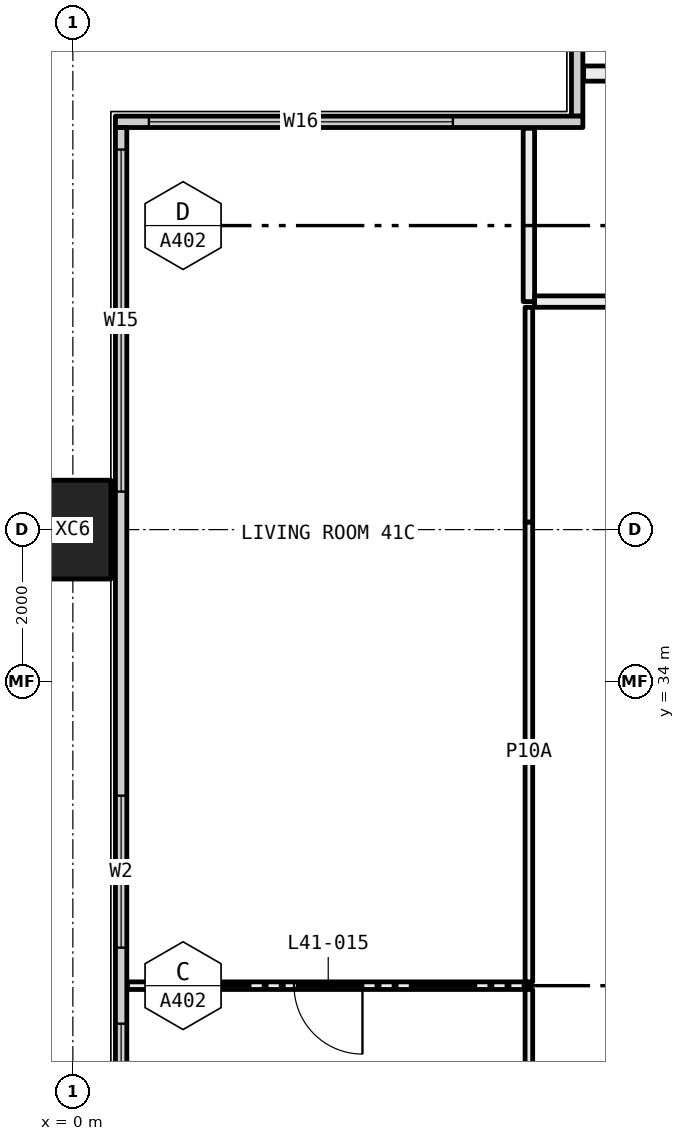
"""IFC4 building model, lengths in metres.
Left out: names, types, materials, properties, quantities, classifications, styles, units other than length and angle.
Written with IfcOpenShell. Run it as: python <this file> out.ifc"""

import sys

from ifc_helpers import new_model, si_unit, direction, frame, frame_2d, origin, origin_2d, place, context, subcontext, project, spatial, rectangle, hollow_rectangle, extrude, element, fill, save


model = new_model("IFC4")
c1 = context("Model", 3, precision=1e-05, world=origin(), true_north=direction((0.0, 1.0)))
c2 = subcontext(c1, "Body", "Model", "MODEL_VIEW")
j1 = project(units=[si_unit("LENGTHUNIT", "METRE"), si_unit("PLANEANGLEUNIT", "RADIAN")], contexts=[c1])
p1 = place(None, origin())
s1 = spatial("IfcSite", under=j1, at=p1, CompositionType="ELEMENT")
p2 = place(p1, origin())
s2 = spatial("IfcBuilding", under=s1, at=p2, CompositionType="ELEMENT")
p3 = place(p2, frame((0.0, 0.0, 158.25)))
s3 = spatial("IfcBuildingStorey", under=s2, at=p3, CompositionType="ELEMENT", Elevation=158.25)
p4 = place(p3, frame((0.0, 36.0, -0.4), z_axis=(0.0, 0.0, 1.0), x_axis=(0.0, 1.0, 0.0)))
e1 = element("IfcColumn", 1, at=p4, inside=s3, PredefinedType="COLUMN", context=c2, shape_type="SweptSolid", body=[
    extrude(hollow_rectangle(XDim=1.3, YDim=1.0, WallThickness=0.05, at=origin_2d()), origin(), (0.0, 0.0, 1.0), 3.45),
])
p5 = place(p3, frame((6.635, 41.44, 0.0), z_axis=(0.0, 0.0, 1.0), x_axis=(0.0, 1.0, 0.0)))
e2 = element("IfcWall", 2, at=p5, inside=s3, PredefinedType="ELEMENTEDWALL", context=c2, shape_type="SweptSolid", body=[
    extrude(rectangle(XDim=5.85, YDim=0.15, at=frame_2d((2.925, 0.0))), origin(), (0.0, 0.0, 1.0), 3.05),
])
p6 = place(p5, frame((1.56, 0.0, 0.45)))
e3 = element("IfcOpeningElement", 3, at=p6, cuts=e2, PredefinedType="OPENING", context=c2, shape_type="SweptSolid", body=[
    extrude(rectangle(XDim=4.0, YDim=2.55, at=frame_2d((2.0, 1.275))), frame((0.0, 0.085, 0.0), z_axis=(0.0, -1.0, 0.0), x_axis=(1.0, 0.0, 0.0)), (0.0, 0.0, 1.0), 0.17),
])
p7 = place(p3, frame((0.56, 41.365, 0.0), z_axis=(0.0, 0.0, 1.0), x_axis=(1.0, 0.0, 0.0)))
e4 = element("IfcWall", 4, at=p7, inside=s3, PredefinedType="ELEMENTEDWALL", context=c2, shape_type="SweptSolid", body=[
    extrude(rectangle(XDim=6.15, YDim=0.15, at=frame_2d((3.075, 0.0))), origin(), (0.0, 0.0, 1.0), 3.05),
])
p8 = place(p7, frame((0.44, 0.0, 0.45)))
e5 = element("IfcOpeningElement", 5, at=p8, cuts=e4, PredefinedType="OPENING", context=c2, shape_type="SweptSolid", body=[
    extrude(rectangle(XDim=4.0, YDim=2.55, at=frame_2d((2.0, 1.275))), frame((0.0, 0.085, 0.0), z_axis=(0.0, -1.0, 0.0), x_axis=(1.0, 0.0, 0.0)), (0.0, 0.0, 1.0), 0.17),
])
p9 = place(p3, frame((0.635, 18.71, 0.0), z_axis=(0.0, 0.0, 1.0), x_axis=(0.0, 1.0, 0.0)))
e6 = element("IfcWall", 6, at=p9, inside=s3, PredefinedType="ELEMENTEDWALL", context=c2, shape_type="SweptSolid", body=[
    extrude(rectangle(XDim=22.58, YDim=0.15, at=frame_2d((11.29, 0.0))), origin(), (0.0, 0.0, 1.0), 3.05),
])
p10 = place(p9, frame((0.29, 0.0, 0.45)))
e7 = element("IfcOpeningElement", 7, at=p10, cuts=e6, PredefinedType="OPENING", context=c2, shape_type="SweptSolid", body=[
    extrude(rectangle(XDim=4.5, YDim=2.55, at=frame_2d((2.25, 1.275))), frame((0.0, 0.085, 0.0), z_axis=(0.0, -1.0, 0.0), x_axis=(1.0, 0.0, 0.0)), (0.0, 0.0, 1.0), 0.17),
])
p11 = place(p9, frame((7.79, 0.0, 0.45)))
e8 = element("IfcOpeningElement", 8, at=p11, cuts=e6, PredefinedType="OPENING", context=c2, shape_type="SweptSolid", body=[
    extrude(rectangle(XDim=3.0, YDim=2.55, at=frame_2d((1.5, 1.275))), frame((0.0, 0.085, 0.0), z_axis=(0.0, -1.0, 0.0), x_axis=(1.0, 0.0, 0.0)), (0.0, 0.0, 1.0), 0.17),
])
p12 = place(p9, frame((11.79, 0.0, 0.45)))
e9 = element("IfcOpeningElement", 9, at=p12, cuts=e6, PredefinedType="OPENING", context=c2, shape_type="SweptSolid", body=[
    extrude(rectangle(XDim=2.0, YDim=2.55, at=frame_2d((1.0, 1.275))), frame((0.0, 0.085, 0.0), z_axis=(0.0, -1.0, 0.0), x_axis=(1.0, 0.0, 0.0)), (0.0, 0.0, 1.0), 0.17),
])
p13 = place(p9, frame((17.79, 0.0, 0.45)))
e10 = element("IfcOpeningElement", 10, at=p13, cuts=e6, PredefinedType="OPENING", context=c2, shape_type="SweptSolid", body=[
    extrude(rectangle(XDim=4.5, YDim=2.55, at=frame_2d((2.25, 1.275))), frame((0.0, 0.085, 0.0), z_axis=(0.0, -1.0, 0.0), x_axis=(1.0, 0.0, 0.0)), (0.0, 0.0, 1.0), 0.17),
])
p14 = place(p3, frame((6.72, 42.0, 0.0), z_axis=(0.0, 0.0, 1.0), x_axis=(1.0, 0.0, 0.0)))
e11 = element("IfcWall", 11, at=p14, inside=s3, PredefinedType="PARTITIONING", context=c2, shape_type="SweptSolid", body=[
    extrude(rectangle(XDim=3.38, YDim=0.2, at=frame_2d((1.69, 0.0))), origin(), (0.0, 0.0, 1.0), 3.05),
])
p15 = place(p3, frame((6.0, 30.0, 0.0), z_axis=(0.0, 0.0, 1.0), x_axis=(-1.0, 0.0, 0.0)))
e12 = element("IfcWall", 12, at=p15, inside=s3, PredefinedType="PARTITIONING", context=c2, shape_type="SweptSolid", body=[
    extrude(rectangle(XDim=5.28, YDim=0.1, at=frame_2d((2.64, 0.0))), origin(), (0.0, 0.0, 1.0), 3.05),
])
p16 = place(p15, frame((2.19, 0.0, 0.0)))
e13 = element("IfcOpeningElement", 13, at=p16, cuts=e12, PredefinedType="OPENING", context=c2, shape_type="SweptSolid", body=[
    extrude(rectangle(XDim=0.9, YDim=2.1, at=frame_2d((0.45, 1.05))), frame((0.0, 0.06, 0.0), z_axis=(0.0, -1.0, 0.0), x_axis=(1.0, 0.0, 0.0)), (0.0, 0.0, 1.0), 0.12),
])
p17 = place(p3, frame((6.0, 25.5, 0.0), z_axis=(0.0, 0.0, 1.0), x_axis=(0.0, 1.0, 0.0)))
e14 = element("IfcWall", 14, at=p17, inside=s3, PredefinedType="PARTITIONING", context=c2, shape_type="SweptSolid", body=[
    extrude(rectangle(XDim=4.45, YDim=0.1, at=frame_2d((2.225, 0.0))), origin(), (0.0, 0.0, 1.0), 3.05),
])
p18 = place(p3, frame((6.0, 30.05, 0.0), z_axis=(0.0, 0.0, 1.0), x_axis=(0.0, 1.0, 0.0)))
e15 = element("IfcWall", 15, at=p18, inside=s3, PredefinedType="PARTITIONING", context=c2, shape_type="SweptSolid", body=[
    extrude(rectangle(XDim=6.05, YDim=0.1, at=frame_2d((3.025, 0.0))), origin(), (0.0, 0.0, 1.0), 2.45),
])
p19 = place(p3, frame((6.0, 36.1, 0.0), z_axis=(0.0, 0.0, 1.0), x_axis=(0.0, 1.0, 0.0)))
e16 = element("IfcWall", 16, at=p19, inside=s3, PredefinedType="PARTITIONING", context=c2, shape_type="SweptSolid", body=[
    extrude(rectangle(XDim=2.825, YDim=0.1, at=frame_2d((1.413, 0.0))), origin(), (0.0, 0.0, 1.0), 3.05),
])
p20 = place(p3, frame((6.0, 39.0, 0.0), z_axis=(0.0, 0.0, 1.0), x_axis=(0.0, 1.0, 0.0)))
e17 = element("IfcWall", 17, at=p20, inside=s3, PredefinedType="PARTITIONING", context=c2, shape_type="SweptSolid", body=[
    extrude(rectangle(XDim=2.28, YDim=0.15, at=frame_2d((1.14, 0.0))), origin(), (0.0, 0.0, 1.0), 3.05),
])
p21 = place(p3, frame((10.0, 39.0, 0.0), z_axis=(0.0, 0.0, 1.0), x_axis=(-1.0, 0.0, 0.0)))
e18 = element("IfcWall", 18, at=p21, inside=s3, PredefinedType="PARTITIONING", context=c2, shape_type="SweptSolid", body=[
    extrude(rectangle(XDim=3.925, YDim=0.15, at=frame_2d((1.962, 0.0))), origin(), (0.0, 0.0, 1.0), 3.05),
])
p22 = place(p21, frame((1.512, 0.0, 0.0)))
e19 = element("IfcOpeningElement", 19, at=p22, cuts=e18, PredefinedType="OPENING", context=c2, shape_type="SweptSolid", body=[
    extrude(rectangle(XDim=0.9, YDim=2.1, at=frame_2d((0.45, 1.05))), frame((0.0, 0.085, 0.0), z_axis=(0.0, -1.0, 0.0), x_axis=(1.0, 0.0, 0.0)), (0.0, 0.0, 1.0), 0.17),
])
p23 = place(p8, origin())
e20 = element("IfcWindow", 20, at=p23, inside=s3, PartitioningType="SINGLE_PANEL", PredefinedType="WINDOW", context=c2, shape_type="SweptSolid", body=[
    extrude(rectangle(XDim=4.0, YDim=2.55, at=frame_2d((2.0, 1.275))), frame((0.0, 0.03, 0.0), z_axis=(0.0, -1.0, 0.0), x_axis=(1.0, 0.0, 0.0)), (0.0, 0.0, 1.0), 0.06),
])
fill(e5, e20)
p24 = place(p11, origin())
e21 = element("IfcWindow", 21, at=p24, inside=s3, PartitioningType="SINGLE_PANEL", PredefinedType="WINDOW", context=c2, shape_type="SweptSolid", body=[
    extrude(rectangle(XDim=3.0, YDim=2.55, at=frame_2d((1.5, 1.275))), frame((0.0, 0.03, 0.0), z_axis=(0.0, -1.0, 0.0), x_axis=(1.0, 0.0, 0.0)), (0.0, 0.0, 1.0), 0.06),
])
fill(e8, e21)
p25 = place(p12, origin())
e22 = element("IfcWindow", 22, at=p25, inside=s3, PartitioningType="SINGLE_PANEL", PredefinedType="WINDOW", context=c2, shape_type="SweptSolid", body=[
    extrude(rectangle(XDim=2.0, YDim=2.55, at=frame_2d((1.0, 1.275))), frame((0.0, 0.03, 0.0), z_axis=(0.0, -1.0, 0.0), x_axis=(1.0, 0.0, 0.0)), (0.0, 0.0, 1.0), 0.06),
])
fill(e9, e22)
p26 = place(p13, origin())
e23 = element("IfcWindow", 23, at=p26, inside=s3, PartitioningType="SINGLE_PANEL", PredefinedType="WINDOW", context=c2, shape_type="SweptSolid", body=[
    extrude(rectangle(XDim=4.5, YDim=2.55, at=frame_2d((2.25, 1.275))), frame((0.0, 0.03, 0.0), z_axis=(0.0, -1.0, 0.0), x_axis=(1.0, 0.0, 0.0)), (0.0, 0.0, 1.0), 0.06),
])
fill(e10, e23)
p27 = place(p16, origin())
e24 = element("IfcDoor", 24, at=p27, inside=s3, OperationType="SINGLE_SWING_RIGHT", PredefinedType="DOOR", context=c2, shape_type="SweptSolid", body=[
    extrude(rectangle(XDim=0.9, YDim=2.1, at=frame_2d((0.45, 1.05))), frame((0.0, 0.025, 0.0), z_axis=(0.0, -1.0, 0.0), x_axis=(1.0, 0.0, 0.0)), (0.0, 0.0, 1.0), 0.05),
])
fill(e13, e24)
save(model, sys.argv[1])
